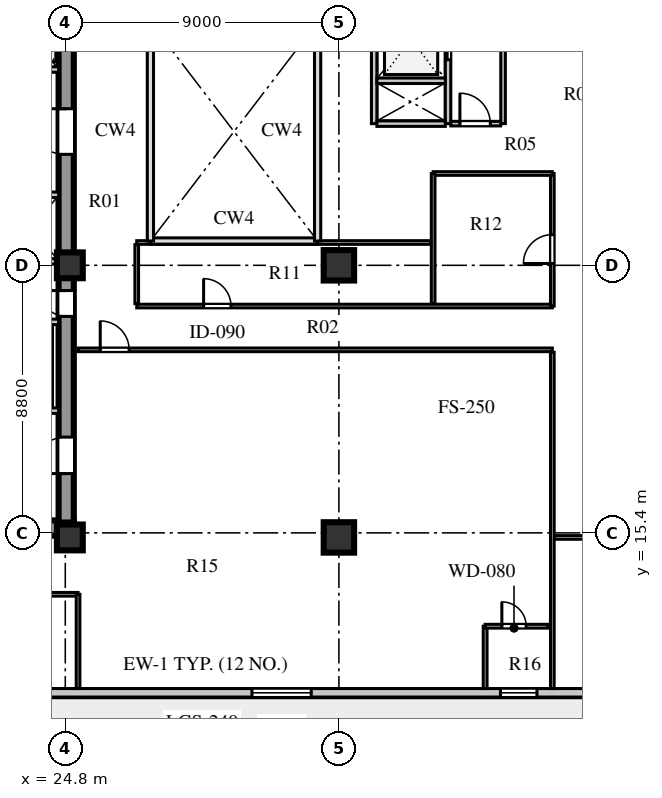
"""IFC4 building model, lengths in metres.
Left out: names, types, materials, properties, quantities, classifications, styles, units other than length and angle.
Written with IfcOpenShell. Run it as: python <this file> out.ifc"""

import sys

from ifc_helpers import new_model, si_unit, direction, frame, frame_2d, origin, origin_2d, place, context, subcontext, project, spatial, rectangle, extrude, element, fill, save


model = new_model("IFC4")
c1 = context("Model", 3, precision=1e-05, world=origin(), true_north=direction((0.0, 1.0)))
c2 = subcontext(c1, "Body", "Model", "MODEL_VIEW")
j1 = project(units=[si_unit("LENGTHUNIT", "METRE"), si_unit("PLANEANGLEUNIT", "RADIAN")], contexts=[c1])
p1 = place(None, origin())
s1 = spatial("IfcSite", under=j1, at=p1, CompositionType="ELEMENT")
p2 = place(p1, origin())
s2 = spatial("IfcBuilding", under=s1, at=p2, CompositionType="ELEMENT")
p3 = place(p2, frame((0.0, 0.0, 104.0)))
s3 = spatial("IfcBuildingStorey", under=s2, at=p3, CompositionType="ELEMENT", Elevation=104.0)
p4 = place(p3, frame((15.4, 15.56, 0.0), z_axis=(0.0, 0.0, 1.0), x_axis=(1.0, 0.0, 0.0)))
e1 = element("IfcWall", 1, at=p4, inside=s3, PredefinedType="SHEAR", context=c2, shape_type="SweptSolid", body=[
    extrude(rectangle(XDim=9.68, YDim=0.5, at=frame_2d((4.84, 0.0))), origin(), (0.0, 0.0, 1.0), 3.6),
])
p5 = place(p3, frame((24.83, 15.74, 0.0), z_axis=(0.0, 0.0, 1.0), x_axis=(0.0, 1.0, 0.0)))
e2 = element("IfcWall", 2, at=p5, inside=s3, PredefinedType="SHEAR", context=c2, shape_type="SweptSolid", body=[
    extrude(rectangle(XDim=25.76, YDim=0.5, at=frame_2d((12.88, 0.0))), origin(), (0.0, 0.0, 1.0), 3.6),
])
p6 = place(p5, frame((1.61, 0.0, 0.0)))
e3 = element("IfcOpeningElement", 3, at=p6, cuts=e2, PredefinedType="OPENING", context=c2, shape_type="SweptSolid", body=[
    extrude(rectangle(XDim=1.2, YDim=2.1, at=frame_2d((0.6, 1.05))), frame((0.0, 0.26, 0.0), z_axis=(0.0, -1.0, 0.0), x_axis=(1.0, 0.0, 0.0)), (0.0, 0.0, 1.0), 0.52),
])
p7 = place(p5, frame((6.78, 0.0, 0.0)))
e4 = element("IfcOpeningElement", 4, at=p7, cuts=e2, PredefinedType="OPENING", context=c2, shape_type="SweptSolid", body=[
    extrude(rectangle(XDim=0.85, YDim=2.06, at=frame_2d((0.425, 1.03))), frame((0.0, 0.26, 0.0), z_axis=(0.0, -1.0, 0.0), x_axis=(1.0, 0.0, 0.0)), (0.0, 0.0, 1.0), 0.52),
])
p8 = place(p5, frame((12.11, 0.0, 0.0)))
e5 = element("IfcOpeningElement", 5, at=p8, cuts=e2, PredefinedType="OPENING", context=c2, shape_type="SweptSolid", body=[
    extrude(rectangle(XDim=1.5, YDim=2.12, at=frame_2d((0.75, 1.06))), frame((0.0, 0.26, 0.0), z_axis=(0.0, -1.0, 0.0), x_axis=(1.0, 0.0, 0.0)), (0.0, 0.0, 1.0), 0.52),
])
p9 = place(p5, frame((20.11, 0.0, 0.0)))
e6 = element("IfcOpeningElement", 6, at=p9, cuts=e2, PredefinedType="OPENING", context=c2, shape_type="SweptSolid", body=[
    extrude(rectangle(XDim=1.2, YDim=2.12, at=frame_2d((0.6, 1.06))), frame((0.0, 0.26, 0.0), z_axis=(0.0, -1.0, 0.0), x_axis=(1.0, 0.0, 0.0)), (0.0, 0.0, 1.0), 0.52),
])
p10 = place(p5, frame((24.01, 0.0, 0.0)))
e7 = element("IfcOpeningElement", 7, at=p10, cuts=e2, PredefinedType="OPENING", context=c2, shape_type="SweptSolid", body=[
    extrude(rectangle(XDim=0.95, YDim=2.1, at=frame_2d((0.475, 1.05))), frame((0.0, 0.26, 0.0), z_axis=(0.0, -1.0, 0.0), x_axis=(1.0, 0.0, 0.0)), (0.0, 0.0, 1.0), 0.52),
])
for number, where, z_axis, x_axis in (
    (8, (24.95, 15.25, 0.0), (0.0, 0.0, 1.0), (1.0, 0.0, 0.0)),
    (9, (24.95, 24.2, 0.0), (0.0, 0.0, 1.0), (1.0, 0.0, 0.0)),
):
    element("IfcColumn", number, at=place(p3, frame(where, z_axis=z_axis, x_axis=x_axis)), inside=s3, PredefinedType="COLUMN", context=c2, shape_type="SweptSolid", body=[
        extrude(rectangle(XDim=0.85, YDim=0.85, at=origin_2d()), origin(), (0.0, 0.0, 1.0), 3.6),
    ])
for number, where, z_axis, x_axis in (
    (10, (33.8, 15.25, 0.0), (0.0, 0.0, 1.0), (1.0, 0.0, 0.0)),
    (11, (33.8, 24.2, 0.0), (0.0, 0.0, 1.0), (1.0, 0.0, 0.0)),
):
    element("IfcColumn", number, at=place(p3, frame(where, z_axis=z_axis, x_axis=x_axis)), inside=s3, PredefinedType="COLUMN", context=c2, shape_type="SweptSolid", body=[
        extrude(rectangle(XDim=1.0, YDim=1.0, at=origin_2d()), origin(), (0.0, 0.0, 1.0), 3.6),
    ])
p11 = place(p3, frame((13.25, 10.14, 0.0), z_axis=(0.0, 0.0, 1.0), x_axis=(1.0, 0.0, 0.0)))
e12 = element("IfcWall", 12, at=p11, inside=s3, PredefinedType="STANDARD", context=c2, shape_type="SweptSolid", body=[
    extrude(rectangle(XDim=32.1, YDim=0.28, at=frame_2d((16.05, 0.0))), origin(), (0.0, 0.0, 1.0), 3.6),
])
p12 = place(p11, frame((0.95, 0.0, 0.0)))
e13 = element("IfcOpeningElement", 13, at=p12, cuts=e12, PredefinedType="OPENING", context=c2, shape_type="SweptSolid", body=[
    extrude(rectangle(XDim=1.0, YDim=2.05, at=frame_2d((0.5, 1.025))), frame((0.0, 0.15, 0.0), z_axis=(0.0, -1.0, 0.0), x_axis=(1.0, 0.0, 0.0)), (0.0, 0.0, 1.0), 0.3),
])
p13 = place(p11, frame((6.105, 0.0, 0.8)))
e14 = element("IfcOpeningElement", 14, at=p13, cuts=e12, PredefinedType="OPENING", context=c2, shape_type="SweptSolid", body=[
    extrude(rectangle(XDim=1.65, YDim=1.95, at=frame_2d((0.825, 0.975))), frame((0.0, 0.15, 0.0), z_axis=(0.0, -1.0, 0.0), x_axis=(1.0, 0.0, 0.0)), (0.0, 0.0, 1.0), 0.3),
])
p14 = place(p11, frame((17.69, 0.0, 0.8)))
e15 = element("IfcOpeningElement", 15, at=p14, cuts=e12, PredefinedType="OPENING", context=c2, shape_type="SweptSolid", body=[
    extrude(rectangle(XDim=1.95, YDim=2.0, at=frame_2d((0.975, 1.0))), frame((0.0, 0.15, 0.0), z_axis=(0.0, -1.0, 0.0), x_axis=(1.0, 0.0, 0.0)), (0.0, 0.0, 1.0), 0.3),
])
p15 = place(p11, frame((25.865, 0.0, 0.8)))
e16 = element("IfcOpeningElement", 16, at=p15, cuts=e12, PredefinedType="OPENING", context=c2, shape_type="SweptSolid", body=[
    extrude(rectangle(XDim=1.2, YDim=1.75, at=frame_2d((0.6, 0.875))), frame((0.0, 0.15, 0.0), z_axis=(0.0, -1.0, 0.0), x_axis=(1.0, 0.0, 0.0)), (0.0, 0.0, 1.0), 0.3),
])
p16 = place(p11, frame((28.88, 0.0, 0.8)))
e17 = element("IfcOpeningElement", 17, at=p16, cuts=e12, PredefinedType="OPENING", context=c2, shape_type="SweptSolid", body=[
    extrude(rectangle(XDim=1.8, YDim=2.0, at=frame_2d((0.9, 1.0))), frame((0.0, 0.15, 0.0), z_axis=(0.0, -1.0, 0.0), x_axis=(1.0, 0.0, 0.0)), (0.0, 0.0, 1.0), 0.3),
])
p17 = place(p3, frame((19.64, 19.42, 0.0), z_axis=(0.0, 0.0, 1.0), x_axis=(1.0, 0.0, 0.0)))
e18 = element("IfcWall", 18, at=p17, inside=s3, PredefinedType="SOLIDWALL", context=c2, shape_type="SweptSolid", body=[
    extrude(rectangle(XDim=4.94, YDim=0.18, at=frame_2d((2.47, 0.0))), origin(), (0.0, 0.0, 1.0), 3.6),
])
p18 = place(p17, frame((0.72, 0.0, 0.0)))
e19 = element("IfcOpeningElement", 19, at=p18, cuts=e18, PredefinedType="OPENING", context=c2, shape_type="SweptSolid", body=[
    extrude(rectangle(XDim=1.1, YDim=2.1, at=frame_2d((0.55, 1.05))), frame((0.0, 0.1, 0.0), z_axis=(0.0, -1.0, 0.0), x_axis=(1.0, 0.0, 0.0)), (0.0, 0.0, 1.0), 0.2),
])
p19 = place(p17, frame((3.02, 0.0, 0.0)))
e20 = element("IfcOpeningElement", 20, at=p19, cuts=e18, PredefinedType="OPENING", context=c2, shape_type="SweptSolid", body=[
    extrude(rectangle(XDim=1.1, YDim=2.1, at=frame_2d((0.55, 1.05))), frame((0.0, 0.1, 0.0), z_axis=(0.0, -1.0, 0.0), x_axis=(1.0, 0.0, 0.0)), (0.0, 0.0, 1.0), 0.2),
])
p20 = place(p3, frame((19.64, 22.34, 0.0), z_axis=(0.0, 0.0, 1.0), x_axis=(1.0, 0.0, 0.0)))
e21 = element("IfcWall", 21, at=p20, inside=s3, PredefinedType="SOLIDWALL", context=c2, shape_type="SweptSolid", body=[
    extrude(rectangle(XDim=4.94, YDim=0.18, at=frame_2d((2.47, 0.0))), origin(), (0.0, 0.0, 1.0), 3.6),
])
p21 = place(p3, frame((15.9, 26.52, 0.0), z_axis=(0.0, 0.0, 1.0), x_axis=(1.0, 0.0, 0.0)))
e22 = element("IfcWall", 22, at=p21, inside=s3, PredefinedType="SOLIDWALL", context=c2, shape_type="SweptSolid", body=[
    extrude(rectangle(XDim=8.68, YDim=0.18, at=frame_2d((4.34, 0.0))), origin(), (0.0, 0.0, 1.0), 3.6),
])
p22 = place(p3, frame((15.9, 24.33, 0.0), z_axis=(0.0, 0.0, 1.0), x_axis=(1.0, 0.0, 0.0)))
e23 = element("IfcWall", 23, at=p22, inside=s3, PredefinedType="SOLIDWALL", context=c2, shape_type="SweptSolid", body=[
    extrude(rectangle(XDim=8.68, YDim=0.18, at=frame_2d((4.34, 0.0))), origin(), (0.0, 0.0, 1.0), 2.95),
])
p23 = place(p3, frame((15.9, 30.64, 0.0), z_axis=(0.0, 0.0, 1.0), x_axis=(1.0, 0.0, 0.0)))
e24 = element("IfcWall", 24, at=p23, inside=s3, PredefinedType="SOLIDWALL", context=c2, shape_type="SweptSolid", body=[
    extrude(rectangle(XDim=8.68, YDim=0.18, at=frame_2d((4.34, 0.0))), origin(), (0.0, 0.0, 1.0), 3.6),
])
p24 = place(p23, frame((1.76, 0.0, 0.0)))
e25 = element("IfcOpeningElement", 25, at=p24, cuts=e24, PredefinedType="OPENING", context=c2, shape_type="SweptSolid", body=[
    extrude(rectangle(XDim=1.0, YDim=2.1, at=frame_2d((0.5, 1.05))), frame((0.0, 0.1, 0.0), z_axis=(0.0, -1.0, 0.0), x_axis=(1.0, 0.0, 0.0)), (0.0, 0.0, 1.0), 0.2),
])
p25 = place(p23, frame((3.6, 0.0, 0.0)))
e26 = element("IfcOpeningElement", 26, at=p25, cuts=e24, PredefinedType="OPENING", context=c2, shape_type="SweptSolid", body=[
    extrude(rectangle(XDim=1.0, YDim=2.1, at=frame_2d((0.5, 1.05))), frame((0.0, 0.1, 0.0), z_axis=(0.0, -1.0, 0.0), x_axis=(1.0, 0.0, 0.0)), (0.0, 0.0, 1.0), 0.2),
])
p26 = place(p23, frame((5.44, 0.0, 0.0)))
e27 = element("IfcOpeningElement", 27, at=p26, cuts=e24, PredefinedType="OPENING", context=c2, shape_type="SweptSolid", body=[
    extrude(rectangle(XDim=1.0, YDim=2.1, at=frame_2d((0.5, 1.05))), frame((0.0, 0.1, 0.0), z_axis=(0.0, -1.0, 0.0), x_axis=(1.0, 0.0, 0.0)), (0.0, 0.0, 1.0), 0.2),
])
p27 = place(p23, frame((7.28, 0.0, 0.0)))
e28 = element("IfcOpeningElement", 28, at=p27, cuts=e24, PredefinedType="OPENING", context=c2, shape_type="SweptSolid", body=[
    extrude(rectangle(XDim=1.0, YDim=2.1, at=frame_2d((0.5, 1.05))), frame((0.0, 0.1, 0.0), z_axis=(0.0, -1.0, 0.0), x_axis=(1.0, 0.0, 0.0)), (0.0, 0.0, 1.0), 0.2),
])
p28 = place(p3, frame((34.96, 28.86, 0.0), z_axis=(0.0, 0.0, 1.0), x_axis=(0.0, 1.0, 0.0)))
e29 = element("IfcWall", 29, at=p28, inside=s3, PredefinedType="SOLIDWALL", context=c2, shape_type="SweptSolid", body=[
    extrude(rectangle(XDim=4.22, YDim=0.18, at=frame_2d((2.11, 0.0))), origin(), (0.0, 0.0, 1.0), 3.6),
])
p29 = place(p3, frame((37.39, 28.86, 0.0), z_axis=(0.0, 0.0, 1.0), x_axis=(0.0, 1.0, 0.0)))
e30 = element("IfcWall", 30, at=p29, inside=s3, PredefinedType="SOLIDWALL", context=c2, shape_type="SweptSolid", body=[
    extrude(rectangle(XDim=4.22, YDim=0.18, at=frame_2d((2.11, 0.0))), origin(), (0.0, 0.0, 1.0), 3.6),
])
p30 = place(p29, frame((2.1, 0.0, 0.0)))
e31 = element("IfcOpeningElement", 31, at=p30, cuts=e30, PredefinedType="OPENING", context=c2, shape_type="SweptSolid", body=[
    extrude(rectangle(XDim=1.2, YDim=2.12, at=frame_2d((0.6, 1.06))), frame((0.0, 0.1, 0.0), z_axis=(0.0, -1.0, 0.0), x_axis=(1.0, 0.0, 0.0)), (0.0, 0.0, 1.0), 0.2),
])
for number, where, z_axis, x_axis in (
    (32, (35.05, 28.86, 0.0), (0.0, 0.0, 1.0), (1.0, 0.0, 0.0)),
    (33, (35.05, 30.27, 0.0), (0.0, 0.0, 1.0), (1.0, 0.0, 0.0)),
):
    element("IfcWall", number, at=place(p3, frame(where, z_axis=z_axis, x_axis=x_axis)), inside=s3, PredefinedType="SOLIDWALL", context=c2, shape_type="SweptSolid", body=[
        extrude(rectangle(XDim=2.25, YDim=0.18, at=frame_2d((1.125, 0.0))), origin(), (0.0, 0.0, 1.0), 3.6),
    ])
p31 = place(p3, frame((39.2, 28.86, 0.0), z_axis=(0.0, 0.0, 1.0), x_axis=(0.0, 1.0, 0.0)))
e34 = element("IfcWall", 34, at=p31, inside=s3, PredefinedType="PARTITIONING", context=c2, shape_type="SweptSolid", body=[
    extrude(rectangle(XDim=4.22, YDim=0.15, at=frame_2d((2.11, 0.0))), origin(), (0.0, 0.0, 1.0), 3.6),
])
p32 = place(p3, frame((37.48, 28.86, 0.0), z_axis=(0.0, 0.0, 1.0), x_axis=(1.0, 0.0, 0.0)))
e35 = element("IfcWall", 35, at=p32, inside=s3, PredefinedType="PARTITIONING", context=c2, shape_type="SweptSolid", body=[
    extrude(rectangle(XDim=1.64, YDim=0.15, at=frame_2d((0.82, 0.0))), origin(), (0.0, 0.0, 1.0), 3.6),
])
p33 = place(p32, frame((0.3, 0.0, 0.0)))
e36 = element("IfcOpeningElement", 36, at=p33, cuts=e35, PredefinedType="OPENING", context=c2, shape_type="SweptSolid", body=[
    extrude(rectangle(XDim=1.0, YDim=2.1, at=frame_2d((0.5, 1.05))), frame((0.0, 0.085, 0.0), z_axis=(0.0, -1.0, 0.0), x_axis=(1.0, 0.0, 0.0)), (0.0, 0.0, 1.0), 0.17),
])
p34 = place(p3, frame((25.22, 21.42, 0.0), z_axis=(0.0, 0.0, 1.0), x_axis=(1.0, 0.0, 0.0)))
e37 = element("IfcWall", 37, at=p34, inside=s3, PredefinedType="PARTITIONING", context=c2, shape_type="SweptSolid", body=[
    extrude(rectangle(XDim=15.6, YDim=0.12, at=frame_2d((7.8, 0.0))), origin(), (0.0, 0.0, 1.0), 3.2),
])
p35 = place(p34, frame((0.73, 0.0, 0.0)))
e38 = element("IfcOpeningElement", 38, at=p35, cuts=e37, PredefinedType="OPENING", context=c2, shape_type="SweptSolid", body=[
    extrude(rectangle(XDim=0.95, YDim=2.1, at=frame_2d((0.475, 1.05))), frame((0.0, 0.07, 0.0), z_axis=(0.0, -1.0, 0.0), x_axis=(1.0, 0.0, 0.0)), (0.0, 0.0, 1.0), 0.14),
])
p36 = place(p3, frame((27.15, 22.86, 0.0), z_axis=(0.0, 0.0, 1.0), x_axis=(1.0, 0.0, 0.0)))
e39 = element("IfcWall", 39, at=p36, inside=s3, PredefinedType="PARTITIONING", context=c2, shape_type="SweptSolid", body=[
    extrude(rectangle(XDim=13.67, YDim=0.12, at=frame_2d((6.835, 0.0))), origin(), (0.0, 0.0, 1.0), 3.6),
])
p37 = place(p36, frame((2.2, 0.0, 0.0)))
e40 = element("IfcOpeningElement", 40, at=p37, cuts=e39, PredefinedType="OPENING", context=c2, shape_type="SweptSolid", body=[
    extrude(rectangle(XDim=0.9, YDim=2.08, at=frame_2d((0.45, 1.04))), frame((0.0, 0.07, 0.0), z_axis=(0.0, -1.0, 0.0), x_axis=(1.0, 0.0, 0.0)), (0.0, 0.0, 1.0), 0.14),
])
p38 = place(p3, frame((40.82, 15.25, 0.0), z_axis=(0.0, 0.0, 1.0), x_axis=(1.0, 0.0, 0.0)))
e41 = element("IfcWall", 41, at=p38, inside=s3, PredefinedType="PARTITIONING", context=c2, shape_type="SweptSolid", body=[
    extrude(rectangle(XDim=7.3, YDim=0.12, at=frame_2d((3.65, 0.0))), origin(), (0.0, 0.0, 1.0), 2.95),
])
p39 = place(p3, frame((40.82, 22.86, 0.0), z_axis=(0.0, 0.0, 1.0), x_axis=(0.0, 1.0, 0.0)))
e42 = element("IfcWall", 42, at=p39, inside=s3, PredefinedType="PARTITIONING", context=c2, shape_type="SweptSolid", body=[
    extrude(rectangle(XDim=4.36, YDim=0.12, at=frame_2d((2.18, 0.0))), origin(), (0.0, 0.0, 1.0), 3.6),
])
p40 = place(p39, frame((1.4, 0.0, 0.0)))
e43 = element("IfcOpeningElement", 43, at=p40, cuts=e42, PredefinedType="OPENING", context=c2, shape_type="SweptSolid", body=[
    extrude(rectangle(XDim=0.95, YDim=2.1, at=frame_2d((0.475, 1.05))), frame((0.0, 0.07, 0.0), z_axis=(0.0, -1.0, 0.0), x_axis=(1.0, 0.0, 0.0)), (0.0, 0.0, 1.0), 0.14),
])
p41 = place(p3, frame((13.59, 13.38, 0.0), z_axis=(0.0, 0.0, 1.0), x_axis=(1.0, 0.0, 0.0)))
e44 = element("IfcWall", 44, at=p41, inside=s3, PredefinedType="PARTITIONING", context=c2, shape_type="SweptSolid", body=[
    extrude(rectangle(XDim=11.63, YDim=0.12, at=frame_2d((5.815, 0.0))), origin(), (0.0, 0.0, 1.0), 3.6),
])
p42 = place(p41, frame((4.56, 0.0, 0.0)))
e45 = element("IfcOpeningElement", 45, at=p42, cuts=e44, PredefinedType="OPENING", context=c2, shape_type="SweptSolid", body=[
    extrude(rectangle(XDim=1.0, YDim=2.08, at=frame_2d((0.5, 1.04))), frame((0.0, 0.07, 0.0), z_axis=(0.0, -1.0, 0.0), x_axis=(1.0, 0.0, 0.0)), (0.0, 0.0, 1.0), 0.14),
])
p43 = place(p3, frame((25.22, 10.28, 0.0), z_axis=(0.0, 0.0, 1.0), x_axis=(0.0, 1.0, 0.0)))
e46 = element("IfcWall", 46, at=p43, inside=s3, PredefinedType="PARTITIONING", context=c2, shape_type="SweptSolid", body=[
    extrude(rectangle(XDim=3.1, YDim=0.12, at=frame_2d((1.55, 0.0))), origin(), (0.0, 0.0, 1.0), 3.1),
])
p44 = place(p3, frame((36.9, 27.22, 0.0), z_axis=(0.0, 0.0, 1.0), x_axis=(1.0, 0.0, 0.0)))
e47 = element("IfcWall", 47, at=p44, inside=s3, PredefinedType="PARTITIONING", context=c2, shape_type="SweptSolid", body=[
    extrude(rectangle(XDim=3.92, YDim=0.12, at=frame_2d((1.96, 0.0))), origin(), (0.0, 0.0, 1.0), 3.2),
])
p45 = place(p3, frame((36.9, 22.94, 0.0), z_axis=(0.0, 0.0, 1.0), x_axis=(0.0, 1.0, 0.0)))
e48 = element("IfcWall", 48, at=p45, inside=s3, PredefinedType="PARTITIONING", context=c2, shape_type="SweptSolid", body=[
    extrude(rectangle(XDim=4.28, YDim=0.12, at=frame_2d((2.14, 0.0))), origin(), (0.0, 0.0, 1.0), 3.6),
])
p46 = place(p3, frame((27.15, 24.95, 0.0), z_axis=(0.0, 0.0, 1.0), x_axis=(1.0, 0.0, 0.0)))
e49 = element("IfcWall", 49, at=p46, inside=s3, PredefinedType="PARTITIONING", context=c2, shape_type="SweptSolid", body=[
    extrude(rectangle(XDim=9.67, YDim=0.12, at=frame_2d((4.835, 0.0))), origin(), (0.0, 0.0, 1.0), 3.05),
])
p47 = place(p3, frame((27.15, 22.94, 0.0), z_axis=(0.0, 0.0, 1.0), x_axis=(0.0, 1.0, 0.0)))
e50 = element("IfcWall", 50, at=p47, inside=s3, PredefinedType="PARTITIONING", context=c2, shape_type="SweptSolid", body=[
    extrude(rectangle(XDim=1.94, YDim=0.12, at=frame_2d((0.97, 0.0))), origin(), (0.0, 0.0, 1.0), 3.6),
])
p48 = place(p3, frame((40.82, 10.28, 0.0), z_axis=(0.0, 0.0, 1.0), x_axis=(0.0, 1.0, 0.0)))
e51 = element("IfcWall", 51, at=p48, inside=s3, PredefinedType="PARTITIONING", context=c2, shape_type="SweptSolid", body=[
    extrude(rectangle(XDim=11.06, YDim=0.12, at=frame_2d((5.53, 0.0))), origin(), (0.0, 0.0, 1.0), 3.6),
])
p49 = place(p3, frame((38.61, 10.28, 0.0), z_axis=(0.0, 0.0, 1.0), x_axis=(0.0, 1.0, 0.0)))
e52 = element("IfcWall", 52, at=p49, inside=s3, PredefinedType="PLUMBINGWALL", context=c2, shape_type="SweptSolid", body=[
    extrude(rectangle(XDim=2.05, YDim=0.125, at=frame_2d((1.025, 0.0))), origin(), (0.0, 0.0, 1.0), 3.6),
])
p50 = place(p3, frame((38.61, 12.33, 0.0), z_axis=(0.0, 0.0, 1.0), x_axis=(1.0, 0.0, 0.0)))
e53 = element("IfcWall", 53, at=p50, inside=s3, PredefinedType="PLUMBINGWALL", context=c2, shape_type="SweptSolid", body=[
    extrude(rectangle(XDim=2.05, YDim=0.125, at=frame_2d((1.025, 0.0))), origin(), (0.0, 0.0, 1.0), 3.6),
])
p51 = place(p50, frame((0.55, 0.0, 0.0)))
e54 = element("IfcOpeningElement", 54, at=p51, cuts=e53, PredefinedType="OPENING", context=c2, shape_type="SweptSolid", body=[
    extrude(rectangle(XDim=0.8, YDim=2.05, at=frame_2d((0.4, 1.025))), frame((0.0, 0.073, 0.0), z_axis=(0.0, -1.0, 0.0), x_axis=(1.0, 0.0, 0.0)), (0.0, 0.0, 1.0), 0.145),
])
p52 = place(p14, origin())
e55 = element("IfcWindow", 55, at=p52, inside=s3, PartitioningType="SINGLE_PANEL", PredefinedType="WINDOW", context=c2, shape_type="SweptSolid", body=[
    extrude(rectangle(XDim=1.95, YDim=2.0, at=frame_2d((0.975, 1.0))), frame((0.0, 0.03, 0.0), z_axis=(0.0, -1.0, 0.0), x_axis=(1.0, 0.0, 0.0)), (0.0, 0.0, 1.0), 0.06),
])
fill(e15, e55)
p53 = place(p15, origin())
e56 = element("IfcWindow", 56, at=p53, inside=s3, PartitioningType="SINGLE_PANEL", PredefinedType="WINDOW", context=c2, shape_type="SweptSolid", body=[
    extrude(rectangle(XDim=1.2, YDim=1.75, at=frame_2d((0.6, 0.875))), frame((0.0, 0.03, 0.0), z_axis=(0.0, -1.0, 0.0), x_axis=(1.0, 0.0, 0.0)), (0.0, 0.0, 1.0), 0.06),
])
fill(e16, e56)
p54 = place(p6, frame((1.2, 0.0, 0.0), z_axis=(0.0, 0.0, 1.0), x_axis=(-1.0, 0.0, 0.0)))
e57 = element("IfcDoor", 57, at=p54, inside=s3, OperationType="SINGLE_SWING_RIGHT", PredefinedType="DOOR", context=c2, shape_type="SweptSolid", body=[
    extrude(rectangle(XDim=1.2, YDim=2.1, at=frame_2d((0.6, 1.05))), frame((0.0, 0.025, 0.0), z_axis=(0.0, -1.0, 0.0), x_axis=(1.0, 0.0, 0.0)), (0.0, 0.0, 1.0), 0.05),
])
fill(e3, e57)
p55 = place(p7, frame((0.85, 0.0, 0.0), z_axis=(0.0, 0.0, 1.0), x_axis=(-1.0, 0.0, 0.0)))
e58 = element("IfcDoor", 58, at=p55, inside=s3, OperationType="SINGLE_SWING_LEFT", PredefinedType="DOOR", context=c2, shape_type="SweptSolid", body=[
    extrude(rectangle(XDim=0.85, YDim=2.06, at=frame_2d((0.425, 1.03))), frame((0.0, 0.025, 0.0), z_axis=(0.0, -1.0, 0.0), x_axis=(1.0, 0.0, 0.0)), (0.0, 0.0, 1.0), 0.05),
])
fill(e4, e58)
p56 = place(p8, frame((1.5, 0.0, 0.0), z_axis=(0.0, 0.0, 1.0), x_axis=(-1.0, 0.0, 0.0)))
e59 = element("IfcDoor", 59, at=p56, inside=s3, OperationType="SINGLE_SWING_LEFT", PredefinedType="DOOR", context=c2, shape_type="SweptSolid", body=[
    extrude(rectangle(XDim=1.5, YDim=2.12, at=frame_2d((0.75, 1.06))), frame((0.0, 0.025, 0.0), z_axis=(0.0, -1.0, 0.0), x_axis=(1.0, 0.0, 0.0)), (0.0, 0.0, 1.0), 0.05),
])
fill(e5, e59)
p57 = place(p30, frame((1.2, 0.0, 0.0), z_axis=(0.0, 0.0, 1.0), x_axis=(-1.0, 0.0, 0.0)))
e60 = element("IfcDoor", 60, at=p57, inside=s3, OperationType="DOUBLE_DOOR_SLIDING", PredefinedType="DOOR", context=c2, shape_type="SweptSolid", body=[
    extrude(rectangle(XDim=1.2, YDim=2.12, at=frame_2d((0.6, 1.06))), frame((0.0, 0.025, 0.0), z_axis=(0.0, -1.0, 0.0), x_axis=(1.0, 0.0, 0.0)), (0.0, 0.0, 1.0), 0.05),
])
fill(e31, e60)
p58 = place(p33, origin())
e61 = element("IfcDoor", 61, at=p58, inside=s3, OperationType="SINGLE_SWING_LEFT", PredefinedType="DOOR", context=c2, shape_type="SweptSolid", body=[
    extrude(rectangle(XDim=1.0, YDim=2.1, at=frame_2d((0.5, 1.05))), frame((0.0, 0.025, 0.0), z_axis=(0.0, -1.0, 0.0), x_axis=(1.0, 0.0, 0.0)), (0.0, 0.0, 1.0), 0.05),
])
fill(e36, e61)
p59 = place(p37, origin())
e62 = element("IfcDoor", 62, at=p59, inside=s3, OperationType="SINGLE_SWING_LEFT", PredefinedType="DOOR", context=c2, shape_type="SweptSolid", body=[
    extrude(rectangle(XDim=0.9, YDim=2.08, at=frame_2d((0.45, 1.04))), frame((0.0, 0.025, 0.0), z_axis=(0.0, -1.0, 0.0), x_axis=(1.0, 0.0, 0.0)), (0.0, 0.0, 1.0), 0.05),
])
fill(e40, e62)
p60 = place(p40, frame((0.95, 0.0, 0.0), z_axis=(0.0, 0.0, 1.0), x_axis=(-1.0, 0.0, 0.0)))
e63 = element("IfcDoor", 63, at=p60, inside=s3, OperationType="SINGLE_SWING_RIGHT", PredefinedType="DOOR", context=c2, shape_type="SweptSolid", body=[
    extrude(rectangle(XDim=0.95, YDim=2.1, at=frame_2d((0.475, 1.05))), frame((0.0, 0.025, 0.0), z_axis=(0.0, -1.0, 0.0), x_axis=(1.0, 0.0, 0.0)), (0.0, 0.0, 1.0), 0.05),
])
fill(e43, e63)
p61 = place(p35, frame((0.95, 0.0, 0.0), z_axis=(0.0, 0.0, 1.0), x_axis=(-1.0, 0.0, 0.0)))
e64 = element("IfcDoor", 64, at=p61, inside=s3, OperationType="SINGLE_SWING_RIGHT", PredefinedType="DOOR", context=c2, shape_type="SweptSolid", body=[
    extrude(rectangle(XDim=0.95, YDim=2.1, at=frame_2d((0.475, 1.05))), frame((0.0, 0.025, 0.0), z_axis=(0.0, -1.0, 0.0), x_axis=(1.0, 0.0, 0.0)), (0.0, 0.0, 1.0), 0.05),
])
fill(e38, e64)
p62 = place(p51, origin())
e65 = element("IfcDoor", 65, at=p62, inside=s3, OperationType="SINGLE_SWING_LEFT", PredefinedType="DOOR", context=c2, shape_type="SweptSolid", body=[
    extrude(rectangle(XDim=0.8, YDim=2.05, at=frame_2d((0.4, 1.025))), frame((0.0, 0.025, 0.0), z_axis=(0.0, -1.0, 0.0), x_axis=(1.0, 0.0, 0.0)), (0.0, 0.0, 1.0), 0.05),
])
fill(e54, e65)
save(model, sys.argv[1])
